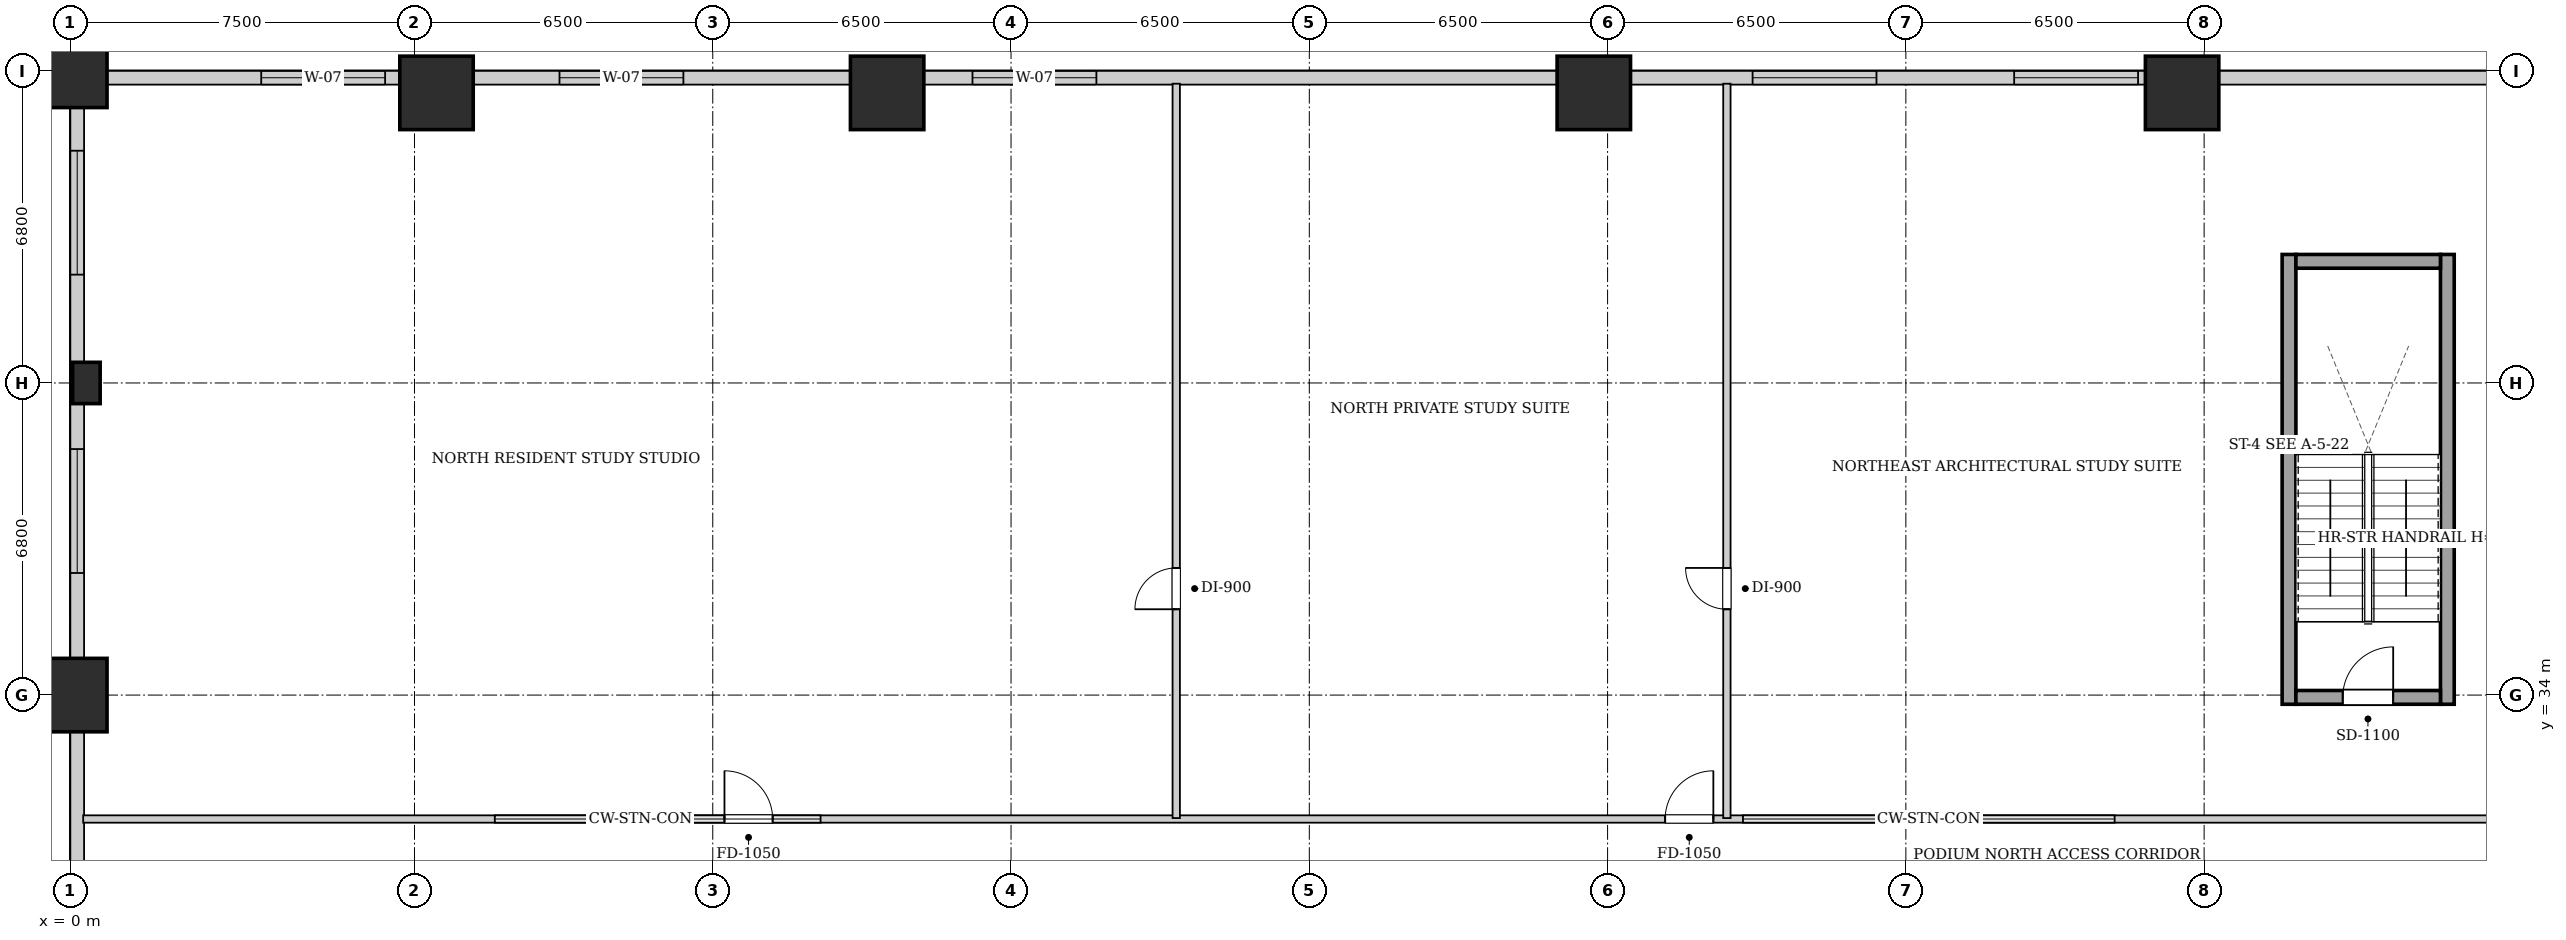
"""IFC4 building model, lengths in metres.
Left out: names, types, materials, properties, quantities, classifications, styles, units other than length and angle.
Written with IfcOpenShell. Run it as: python <this file> out.ifc"""

import sys

from ifc_helpers import new_model, si_unit, direction, frame, frame_2d, origin, origin_2d, place, context, subcontext, project, spatial, rectangle, extrude, element, fill, save


model = new_model("IFC4")
c1 = context("Model", 3, precision=1e-05, world=origin(), true_north=direction((0.0, 1.0)))
c2 = subcontext(c1, "Body", "Model", "MODEL_VIEW")
j1 = project(units=[si_unit("LENGTHUNIT", "METRE"), si_unit("PLANEANGLEUNIT", "RADIAN")], contexts=[c1])
p1 = place(None, origin())
s1 = spatial("IfcSite", under=j1, at=p1, CompositionType="ELEMENT")
p2 = place(p1, origin())
s2 = spatial("IfcBuilding", under=s1, at=p2, CompositionType="ELEMENT")
p3 = place(p2, frame((0.0, 0.0, 11.2)))
s3 = spatial("IfcBuildingStorey", under=s2, at=p3, CompositionType="ELEMENT", Elevation=11.2)
for number, where, z_axis, x_axis in (
    (1, (0.0, 34.0, 0.0), (0.0, 0.0, 1.0), (1.0, 0.0, 0.0)),
    (2, (0.0, 47.6, 0.0), (0.0, 0.0, 1.0), (1.0, 0.0, 0.0)),
    (3, (7.98, 47.12, 0.0), (0.0, 0.0, 1.0), (1.0, 0.0, 0.0)),
    (4, (46.02, 47.12, 0.0), (0.0, 0.0, 1.0), (1.0, 0.0, 0.0)),
    (5, (17.8, 47.12, 0.0), (0.0, 0.0, 1.0), (1.0, 0.0, 0.0)),
    (6, (33.2, 47.12, 0.0), (0.0, 0.0, 1.0), (1.0, 0.0, 0.0)),
):
    element("IfcColumn", number, at=place(p3, frame(where, z_axis=z_axis, x_axis=x_axis)), inside=s3, PredefinedType="COLUMN", context=c2, shape_type="SweptSolid", body=[
        extrude(rectangle(XDim=1.6, YDim=1.6, at=origin_2d()), origin(), (0.0, 0.0, 1.0), 4.8),
    ])
p4 = place(p3, frame((0.35, 40.8, 0.0), z_axis=(0.0, 0.0, 1.0), x_axis=(1.0, 0.0, 0.0)))
e7 = element("IfcColumn", 7, at=p4, inside=s3, PredefinedType="PILASTER", context=c2, shape_type="SweptSolid", body=[
    extrude(rectangle(XDim=0.6, YDim=0.9, at=origin_2d()), origin(), (0.0, 0.0, 1.0), 4.8),
])
p5 = place(p3, frame((0.16, 47.45, 0.0), z_axis=(0.0, 0.0, 1.0), x_axis=(1.0, 0.0, 0.0)))
e8 = element("IfcWall", 8, at=p5, inside=s3, PredefinedType="SOLIDWALL", context=c2, shape_type="SweptSolid", body=[
    extrude(rectangle(XDim=53.68, YDim=0.3, at=frame_2d((26.84, 0.0))), origin(), (0.0, 0.0, 1.0), 3.365),
])
p6 = place(p5, frame((4.0, 0.0, 0.9)))
e9 = element("IfcOpeningElement", 9, at=p6, cuts=e8, PredefinedType="OPENING", context=c2, shape_type="SweptSolid", body=[
    extrude(rectangle(XDim=2.7, YDim=2.1, at=frame_2d((1.35, 1.05))), frame((0.0, 0.16, 0.0), z_axis=(0.0, -1.0, 0.0), x_axis=(1.0, 0.0, 0.0)), (0.0, 0.0, 1.0), 0.32),
])
p7 = place(p5, frame((10.5, 0.0, 0.9)))
e10 = element("IfcOpeningElement", 10, at=p7, cuts=e8, PredefinedType="OPENING", context=c2, shape_type="SweptSolid", body=[
    extrude(rectangle(XDim=2.7, YDim=2.1, at=frame_2d((1.35, 1.05))), frame((0.0, 0.16, 0.0), z_axis=(0.0, -1.0, 0.0), x_axis=(1.0, 0.0, 0.0)), (0.0, 0.0, 1.0), 0.32),
])
p8 = place(p5, frame((19.5, 0.0, 0.9)))
e11 = element("IfcOpeningElement", 11, at=p8, cuts=e8, PredefinedType="OPENING", context=c2, shape_type="SweptSolid", body=[
    extrude(rectangle(XDim=2.7, YDim=2.1, at=frame_2d((1.35, 1.05))), frame((0.0, 0.16, 0.0), z_axis=(0.0, -1.0, 0.0), x_axis=(1.0, 0.0, 0.0)), (0.0, 0.0, 1.0), 0.32),
])
p9 = place(p5, frame((36.5, 0.0, 0.9)))
e12 = element("IfcOpeningElement", 12, at=p9, cuts=e8, PredefinedType="OPENING", context=c2, shape_type="SweptSolid", body=[
    extrude(rectangle(XDim=2.7, YDim=2.1, at=frame_2d((1.35, 1.05))), frame((0.0, 0.16, 0.0), z_axis=(0.0, -1.0, 0.0), x_axis=(1.0, 0.0, 0.0)), (0.0, 0.0, 1.0), 0.32),
])
p10 = place(p5, frame((42.2, 0.0, 0.9)))
e13 = element("IfcOpeningElement", 13, at=p10, cuts=e8, PredefinedType="OPENING", context=c2, shape_type="SweptSolid", body=[
    extrude(rectangle(XDim=2.7, YDim=2.1, at=frame_2d((1.35, 1.05))), frame((0.0, 0.16, 0.0), z_axis=(0.0, -1.0, 0.0), x_axis=(1.0, 0.0, 0.0)), (0.0, 0.0, 1.0), 0.32),
])
p11 = place(p3, frame((0.15, 0.16, 0.0), z_axis=(0.0, 0.0, 1.0), x_axis=(0.0, 1.0, 0.0)))
e14 = element("IfcWall", 14, at=p11, inside=s3, PredefinedType="SOLIDWALL", context=c2, shape_type="SweptSolid", body=[
    extrude(rectangle(XDim=47.28, YDim=0.3, at=frame_2d((23.64, 0.0))), origin(), (0.0, 0.0, 1.0), 3.365),
])
p12 = place(p11, frame((3.33, 0.0, 0.9)))
e15 = element("IfcOpeningElement", 15, at=p12, cuts=e14, PredefinedType="OPENING", context=c2, shape_type="SweptSolid", body=[
    extrude(rectangle(XDim=2.7, YDim=2.1, at=frame_2d((1.35, 1.05))), frame((0.0, 0.16, 0.0), z_axis=(0.0, -1.0, 0.0), x_axis=(1.0, 0.0, 0.0)), (0.0, 0.0, 1.0), 0.32),
])
p13 = place(p11, frame((9.34, 0.0, 0.9)))
e16 = element("IfcOpeningElement", 16, at=p13, cuts=e14, PredefinedType="OPENING", context=c2, shape_type="SweptSolid", body=[
    extrude(rectangle(XDim=2.7, YDim=2.1, at=frame_2d((1.35, 1.05))), frame((0.0, 0.16, 0.0), z_axis=(0.0, -1.0, 0.0), x_axis=(1.0, 0.0, 0.0)), (0.0, 0.0, 1.0), 0.32),
])
p14 = place(p11, frame((17.18, 0.0, 0.85)))
e17 = element("IfcOpeningElement", 17, at=p14, cuts=e14, PredefinedType="OPENING", context=c2, shape_type="SweptSolid", body=[
    extrude(rectangle(XDim=2.1, YDim=1.85, at=frame_2d((1.05, 0.925))), frame((0.0, 0.16, 0.0), z_axis=(0.0, -1.0, 0.0), x_axis=(1.0, 0.0, 0.0)), (0.0, 0.0, 1.0), 0.32),
])
p15 = place(p11, frame((36.5, 0.0, 0.9)))
e18 = element("IfcOpeningElement", 18, at=p15, cuts=e14, PredefinedType="OPENING", context=c2, shape_type="SweptSolid", body=[
    extrude(rectangle(XDim=2.7, YDim=2.1, at=frame_2d((1.35, 1.05))), frame((0.0, 0.16, 0.0), z_axis=(0.0, -1.0, 0.0), x_axis=(1.0, 0.0, 0.0)), (0.0, 0.0, 1.0), 0.32),
])
p16 = place(p11, frame((43.0, 0.0, 0.9)))
e19 = element("IfcOpeningElement", 19, at=p16, cuts=e14, PredefinedType="OPENING", context=c2, shape_type="SweptSolid", body=[
    extrude(rectangle(XDim=2.7, YDim=2.1, at=frame_2d((1.35, 1.05))), frame((0.0, 0.16, 0.0), z_axis=(0.0, -1.0, 0.0), x_axis=(1.0, 0.0, 0.0)), (0.0, 0.0, 1.0), 0.32),
])
for number, where, z_axis, x_axis in (
    (20, (48.35, 33.8, 0.0), (0.0, 0.0, 1.0), (0.0, 1.0, 0.0)),
    (21, (51.8, 33.8, 0.0), (0.0, 0.0, 1.0), (0.0, 1.0, 0.0)),
):
    element("IfcWall", number, at=place(p3, frame(where, z_axis=z_axis, x_axis=x_axis)), inside=s3, PredefinedType="SHEAR", context=c2, shape_type="SweptSolid", body=[
        extrude(rectangle(XDim=9.8, YDim=0.3, at=frame_2d((4.9, 0.0))), origin(), (0.0, 0.0, 1.0), 4.48),
    ])
p17 = place(p3, frame((48.5, 43.45, 0.0), z_axis=(0.0, 0.0, 1.0), x_axis=(1.0, 0.0, 0.0)))
e22 = element("IfcWall", 22, at=p17, inside=s3, PredefinedType="SHEAR", context=c2, shape_type="SweptSolid", body=[
    extrude(rectangle(XDim=3.15, YDim=0.3, at=frame_2d((1.575, 0.0))), origin(), (0.0, 0.0, 1.0), 4.48),
])
p18 = place(p3, frame((48.5, 33.95, 0.0), z_axis=(0.0, 0.0, 1.0), x_axis=(1.0, 0.0, 0.0)))
e23 = element("IfcWall", 23, at=p18, inside=s3, PredefinedType="SHEAR", context=c2, shape_type="SweptSolid", body=[
    extrude(rectangle(XDim=3.15, YDim=0.3, at=frame_2d((1.575, 0.0))), origin(), (0.0, 0.0, 1.0), 4.48),
])
p19 = place(p18, frame((1.02, 0.0, 0.0)))
e24 = element("IfcOpeningElement", 24, at=p19, cuts=e23, PredefinedType="OPENING", context=c2, shape_type="SweptSolid", body=[
    extrude(rectangle(XDim=1.1, YDim=2.05, at=frame_2d((0.55, 1.025))), frame((0.0, 0.16, 0.0), z_axis=(0.0, -1.0, 0.0), x_axis=(1.0, 0.0, 0.0)), (0.0, 0.0, 1.0), 0.32),
])
p20 = place(p3, frame((0.28, 31.3, 0.0), z_axis=(0.0, 0.0, 1.0), x_axis=(1.0, 0.0, 0.0)))
e25 = element("IfcWall", 25, at=p20, inside=s3, PredefinedType="PARTITIONING", context=c2, shape_type="SweptSolid", body=[
    extrude(rectangle(XDim=53.44, YDim=0.16, at=frame_2d((26.72, 0.0))), origin(), (0.0, 0.0, 1.0), 4.48),
])
p21 = place(p20, frame((13.975, 0.0, 0.0)))
e26 = element("IfcOpeningElement", 26, at=p21, cuts=e25, PredefinedType="OPENING", context=c2, shape_type="SweptSolid", body=[
    extrude(rectangle(XDim=1.05, YDim=2.05, at=frame_2d((0.525, 1.025))), frame((0.0, 0.09, 0.0), z_axis=(0.0, -1.0, 0.0), x_axis=(1.0, 0.0, 0.0)), (0.0, 0.0, 1.0), 0.18),
])
p22 = place(p20, frame((34.475, 0.0, 0.0)))
e27 = element("IfcOpeningElement", 27, at=p22, cuts=e25, PredefinedType="OPENING", context=c2, shape_type="SweptSolid", body=[
    extrude(rectangle(XDim=1.05, YDim=2.05, at=frame_2d((0.525, 1.025))), frame((0.0, 0.09, 0.0), z_axis=(0.0, -1.0, 0.0), x_axis=(1.0, 0.0, 0.0)), (0.0, 0.0, 1.0), 0.18),
])
p23 = place(p3, frame((24.1, 31.32, 0.0), z_axis=(0.0, 0.0, 1.0), x_axis=(0.0, 1.0, 0.0)))
e28 = element("IfcWall", 28, at=p23, inside=s3, PredefinedType="PARTITIONING", context=c2, shape_type="SweptSolid", body=[
    extrude(rectangle(XDim=16.0, YDim=0.16, at=frame_2d((8.0, 0.0))), origin(), (0.0, 0.0, 1.0), 4.48),
])
p24 = place(p23, frame((4.55, 0.0, 0.0)))
e29 = element("IfcOpeningElement", 29, at=p24, cuts=e28, PredefinedType="OPENING", context=c2, shape_type="SweptSolid", body=[
    extrude(rectangle(XDim=0.9, YDim=2.05, at=frame_2d((0.45, 1.025))), frame((0.0, 0.09, 0.0), z_axis=(0.0, -1.0, 0.0), x_axis=(1.0, 0.0, 0.0)), (0.0, 0.0, 1.0), 0.18),
])
p25 = place(p3, frame((36.1, 31.32, 0.0), z_axis=(0.0, 0.0, 1.0), x_axis=(0.0, 1.0, 0.0)))
e30 = element("IfcWall", 30, at=p25, inside=s3, PredefinedType="PARTITIONING", context=c2, shape_type="SweptSolid", body=[
    extrude(rectangle(XDim=16.0, YDim=0.16, at=frame_2d((8.0, 0.0))), origin(), (0.0, 0.0, 1.0), 4.48),
])
p26 = place(p25, frame((4.55, 0.0, 0.0)))
e31 = element("IfcOpeningElement", 31, at=p26, cuts=e30, PredefinedType="OPENING", context=c2, shape_type="SweptSolid", body=[
    extrude(rectangle(XDim=0.9, YDim=2.05, at=frame_2d((0.45, 1.025))), frame((0.0, 0.09, 0.0), z_axis=(0.0, -1.0, 0.0), x_axis=(1.0, 0.0, 0.0)), (0.0, 0.0, 1.0), 0.18),
])
p27 = place(p19, origin())
e32 = element("IfcDoor", 32, at=p27, inside=s3, OperationType="SINGLE_SWING_RIGHT", PredefinedType="DOOR", context=c2, shape_type="SweptSolid", body=[
    extrude(rectangle(XDim=1.1, YDim=2.05, at=frame_2d((0.55, 1.025))), frame((0.0, 0.025, 0.0), z_axis=(0.0, -1.0, 0.0), x_axis=(1.0, 0.0, 0.0)), (0.0, 0.0, 1.0), 0.05),
])
fill(e24, e32)
p28 = place(p21, origin())
e33 = element("IfcDoor", 33, at=p28, inside=s3, OperationType="SINGLE_SWING_LEFT", PredefinedType="DOOR", context=c2, shape_type="SweptSolid", body=[
    extrude(rectangle(XDim=1.05, YDim=2.05, at=frame_2d((0.525, 1.025))), frame((0.0, 0.025, 0.0), z_axis=(0.0, -1.0, 0.0), x_axis=(1.0, 0.0, 0.0)), (0.0, 0.0, 1.0), 0.05),
])
fill(e26, e33)
p29 = place(p22, origin())
e34 = element("IfcDoor", 34, at=p29, inside=s3, OperationType="SINGLE_SWING_RIGHT", PredefinedType="DOOR", context=c2, shape_type="SweptSolid", body=[
    extrude(rectangle(XDim=1.05, YDim=2.05, at=frame_2d((0.525, 1.025))), frame((0.0, 0.025, 0.0), z_axis=(0.0, -1.0, 0.0), x_axis=(1.0, 0.0, 0.0)), (0.0, 0.0, 1.0), 0.05),
])
fill(e27, e34)
p30 = place(p24, origin())
e35 = element("IfcDoor", 35, at=p30, inside=s3, OperationType="SINGLE_SWING_LEFT", PredefinedType="DOOR", context=c2, shape_type="SweptSolid", body=[
    extrude(rectangle(XDim=0.9, YDim=2.05, at=frame_2d((0.45, 1.025))), frame((0.0, 0.025, 0.0), z_axis=(0.0, -1.0, 0.0), x_axis=(1.0, 0.0, 0.0)), (0.0, 0.0, 1.0), 0.05),
])
fill(e29, e35)
p31 = place(p26, origin())
e36 = element("IfcDoor", 36, at=p31, inside=s3, OperationType="SINGLE_SWING_RIGHT", PredefinedType="DOOR", context=c2, shape_type="SweptSolid", body=[
    extrude(rectangle(XDim=0.9, YDim=2.05, at=frame_2d((0.45, 1.025))), frame((0.0, 0.025, 0.0), z_axis=(0.0, -1.0, 0.0), x_axis=(1.0, 0.0, 0.0)), (0.0, 0.0, 1.0), 0.05),
])
fill(e31, e36)
p32 = place(p6, origin())
e37 = element("IfcWindow", 37, at=p32, inside=s3, PartitioningType="TRIPLE_PANEL_VERTICAL", PredefinedType="WINDOW", context=c2, shape_type="SweptSolid", body=[
    extrude(rectangle(XDim=2.7, YDim=2.1, at=frame_2d((1.35, 1.05))), frame((0.0, 0.03, 0.0), z_axis=(0.0, -1.0, 0.0), x_axis=(1.0, 0.0, 0.0)), (0.0, 0.0, 1.0), 0.06),
])
fill(e9, e37)
p33 = place(p7, origin())
e38 = element("IfcWindow", 38, at=p33, inside=s3, PartitioningType="TRIPLE_PANEL_VERTICAL", PredefinedType="WINDOW", context=c2, shape_type="SweptSolid", body=[
    extrude(rectangle(XDim=2.7, YDim=2.1, at=frame_2d((1.35, 1.05))), frame((0.0, 0.03, 0.0), z_axis=(0.0, -1.0, 0.0), x_axis=(1.0, 0.0, 0.0)), (0.0, 0.0, 1.0), 0.06),
])
fill(e10, e38)
p34 = place(p8, origin())
e39 = element("IfcWindow", 39, at=p34, inside=s3, PartitioningType="TRIPLE_PANEL_VERTICAL", PredefinedType="WINDOW", context=c2, shape_type="SweptSolid", body=[
    extrude(rectangle(XDim=2.7, YDim=2.1, at=frame_2d((1.35, 1.05))), frame((0.0, 0.03, 0.0), z_axis=(0.0, -1.0, 0.0), x_axis=(1.0, 0.0, 0.0)), (0.0, 0.0, 1.0), 0.06),
])
fill(e11, e39)
p35 = place(p9, origin())
e40 = element("IfcWindow", 40, at=p35, inside=s3, PartitioningType="TRIPLE_PANEL_VERTICAL", PredefinedType="WINDOW", context=c2, shape_type="SweptSolid", body=[
    extrude(rectangle(XDim=2.7, YDim=2.1, at=frame_2d((1.35, 1.05))), frame((0.0, 0.03, 0.0), z_axis=(0.0, -1.0, 0.0), x_axis=(1.0, 0.0, 0.0)), (0.0, 0.0, 1.0), 0.06),
])
fill(e12, e40)
p36 = place(p10, origin())
e41 = element("IfcWindow", 41, at=p36, inside=s3, PartitioningType="TRIPLE_PANEL_VERTICAL", PredefinedType="WINDOW", context=c2, shape_type="SweptSolid", body=[
    extrude(rectangle(XDim=2.7, YDim=2.1, at=frame_2d((1.35, 1.05))), frame((0.0, 0.03, 0.0), z_axis=(0.0, -1.0, 0.0), x_axis=(1.0, 0.0, 0.0)), (0.0, 0.0, 1.0), 0.06),
])
fill(e13, e41)
p37 = place(p15, origin())
e42 = element("IfcWindow", 42, at=p37, inside=s3, PartitioningType="TRIPLE_PANEL_VERTICAL", PredefinedType="WINDOW", context=c2, shape_type="SweptSolid", body=[
    extrude(rectangle(XDim=2.7, YDim=2.1, at=frame_2d((1.35, 1.05))), frame((0.0, 0.03, 0.0), z_axis=(0.0, -1.0, 0.0), x_axis=(1.0, 0.0, 0.0)), (0.0, 0.0, 1.0), 0.06),
])
fill(e18, e42)
p38 = place(p16, origin())
e43 = element("IfcWindow", 43, at=p38, inside=s3, PartitioningType="TRIPLE_PANEL_VERTICAL", PredefinedType="WINDOW", context=c2, shape_type="SweptSolid", body=[
    extrude(rectangle(XDim=2.7, YDim=2.1, at=frame_2d((1.35, 1.05))), frame((0.0, 0.03, 0.0), z_axis=(0.0, -1.0, 0.0), x_axis=(1.0, 0.0, 0.0)), (0.0, 0.0, 1.0), 0.06),
])
fill(e19, e43)
save(model, sys.argv[1])
